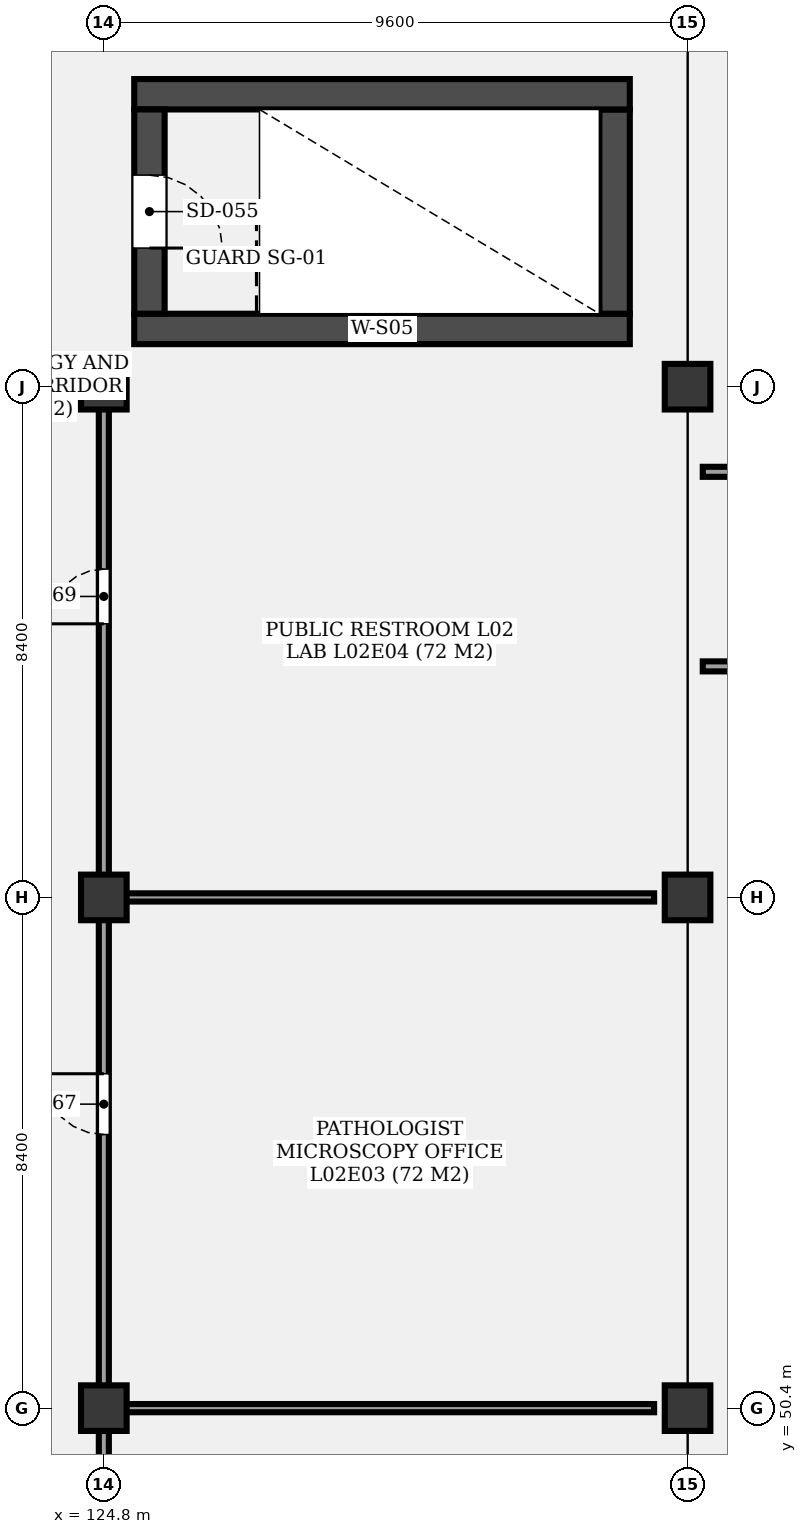
"""IFC4 building model, lengths in metres.
Left out: names, types, materials, properties, quantities, classifications, styles, units other than length and angle.
Written with IfcOpenShell. Run it as: python <this file> out.ifc"""

import sys

from ifc_helpers import new_model, si_unit, direction, frame, frame_2d, origin, origin_2d, place, context, subcontext, project, spatial, rectangle, extrude, element, fill, save


model = new_model("IFC4")
c1 = context("Model", 3, precision=1e-05, world=origin(), true_north=direction((0.0, 1.0)))
c2 = subcontext(c1, "Body", "Model", "MODEL_VIEW")
j1 = project(units=[si_unit("LENGTHUNIT", "METRE"), si_unit("PLANEANGLEUNIT", "RADIAN")], contexts=[c1])
p1 = place(None, origin())
s1 = spatial("IfcSite", under=j1, at=p1, CompositionType="ELEMENT")
p2 = place(p1, origin())
s2 = spatial("IfcBuilding", under=s1, at=p2, CompositionType="ELEMENT")
p3 = place(p2, frame((0.0, 0.0, 9.9)))
s3 = spatial("IfcBuildingStorey", under=s2, at=p3, CompositionType="ELEMENT", Elevation=9.9)
for number, where, z_axis, x_axis in (
    (1, (124.8, 50.4, 0.0), (0.0, 0.0, 1.0), (1.0, 0.0, 0.0)),
    (2, (124.8, 58.8, 0.0), (0.0, 0.0, 1.0), (1.0, 0.0, 0.0)),
    (3, (124.8, 67.2, 0.0), (0.0, 0.0, 1.0), (1.0, 0.0, 0.0)),
    (4, (134.4, 50.4, 0.0), (0.0, 0.0, 1.0), (1.0, 0.0, 0.0)),
    (5, (134.4, 58.8, 0.0), (0.0, 0.0, 1.0), (1.0, 0.0, 0.0)),
    (6, (134.4, 67.2, 0.0), (0.0, 0.0, 1.0), (1.0, 0.0, 0.0)),
):
    element("IfcColumn", number, at=place(p3, frame(where, z_axis=z_axis, x_axis=x_axis)), inside=s3, PredefinedType="COLUMN", context=c2, shape_type="SweptSolid", body=[
        extrude(rectangle(XDim=0.75, YDim=0.75, at=origin_2d()), origin(), (0.0, 0.0, 1.0), 3.6),
    ])
p4 = place(p3, frame((125.3, 68.15, 0.0), z_axis=(0.0, 0.0, 1.0), x_axis=(1.0, 0.0, 0.0)))
e7 = element("IfcWall", 7, at=p4, inside=s3, PredefinedType="SHEAR", context=c2, shape_type="SweptSolid", body=[
    extrude(rectangle(XDim=8.15, YDim=0.5, at=frame_2d((4.075, 0.0))), origin(), (0.0, 0.0, 1.0), 3.6),
])
p5 = place(p3, frame((133.2, 68.4, 0.0), z_axis=(0.0, 0.0, 1.0), x_axis=(0.0, 1.0, 0.0)))
e8 = element("IfcWall", 8, at=p5, inside=s3, PredefinedType="SHEAR", context=c2, shape_type="SweptSolid", body=[
    extrude(rectangle(XDim=3.36, YDim=0.5, at=frame_2d((1.68, 0.0))), origin(), (0.0, 0.0, 1.0), 3.6),
])
p6 = place(p3, frame((133.45, 72.01, 0.0), z_axis=(0.0, 0.0, 1.0), x_axis=(-1.0, 0.0, 0.0)))
e9 = element("IfcWall", 9, at=p6, inside=s3, PredefinedType="SHEAR", context=c2, shape_type="SweptSolid", body=[
    extrude(rectangle(XDim=8.15, YDim=0.5, at=frame_2d((4.075, 0.0))), origin(), (0.0, 0.0, 1.0), 3.6),
])
p7 = place(p3, frame((125.55, 71.76, 0.0), z_axis=(0.0, 0.0, 1.0), x_axis=(0.0, -1.0, 0.0)))
e10 = element("IfcWall", 10, at=p7, inside=s3, PredefinedType="SHEAR", context=c2, shape_type="SweptSolid", body=[
    extrude(rectangle(XDim=3.36, YDim=0.5, at=frame_2d((1.68, 0.0))), origin(), (0.0, 0.0, 1.0), 3.6),
])
p8 = place(p7, frame((1.08, 0.0, 0.0)))
e11 = element("IfcOpeningElement", 11, at=p8, cuts=e10, PredefinedType="OPENING", context=c2, shape_type="SweptSolid", body=[
    extrude(rectangle(XDim=1.2, YDim=2.2, at=frame_2d((0.6, 1.1))), frame((0.0, 0.26, 0.0), z_axis=(0.0, -1.0, 0.0), x_axis=(1.0, 0.0, 0.0)), (0.0, 0.0, 1.0), 0.52),
])
p9 = place(p3, frame((124.8, 42.25, 0.0), z_axis=(0.0, 0.0, 1.0), x_axis=(0.0, 1.0, 0.0)))
e12 = element("IfcWall", 12, at=p9, inside=s3, PredefinedType="PARTITIONING", context=c2, shape_type="SweptSolid", body=[
    extrude(rectangle(XDim=7.9, YDim=0.165, at=frame_2d((3.95, 0.0))), origin(), (0.0, 0.0, 1.0), 2.48),
])
p10 = place(p9, frame((4.25, 0.0, 0.0)))
e13 = element("IfcOpeningElement", 13, at=p10, cuts=e12, PredefinedType="OPENING", context=c2, shape_type="SweptSolid", body=[
    extrude(rectangle(XDim=0.9, YDim=2.1, at=frame_2d((0.45, 1.05))), frame((0.0, 0.093, 0.0), z_axis=(0.0, -1.0, 0.0), x_axis=(1.0, 0.0, 0.0)), (0.0, 0.0, 1.0), 0.185),
])
p11 = place(p3, frame((124.8, 50.65, 0.0), z_axis=(0.0, 0.0, 1.0), x_axis=(0.0, 1.0, 0.0)))
e14 = element("IfcWall", 14, at=p11, inside=s3, PredefinedType="PARTITIONING", context=c2, shape_type="SweptSolid", body=[
    extrude(rectangle(XDim=7.9, YDim=0.165, at=frame_2d((3.95, 0.0))), origin(), (0.0, 0.0, 1.0), 2.48),
])
p12 = place(p11, frame((4.25, 0.0, 0.0)))
e15 = element("IfcOpeningElement", 15, at=p12, cuts=e14, PredefinedType="OPENING", context=c2, shape_type="SweptSolid", body=[
    extrude(rectangle(XDim=1.0, YDim=2.2, at=frame_2d((0.5, 1.1))), frame((0.0, 0.093, 0.0), z_axis=(0.0, -1.0, 0.0), x_axis=(1.0, 0.0, 0.0)), (0.0, 0.0, 1.0), 0.185),
])
p13 = place(p3, frame((124.95, 50.4, 0.0), z_axis=(0.0, 0.0, 1.0), x_axis=(1.0, 0.0, 0.0)))
e16 = element("IfcWall", 16, at=p13, inside=s3, PredefinedType="PARTITIONING", context=c2, shape_type="SweptSolid", body=[
    extrude(rectangle(XDim=8.9, YDim=0.135, at=frame_2d((4.45, 0.0))), origin(), (0.0, 0.0, 1.0), 2.48),
])
p14 = place(p3, frame((124.8, 59.05, 0.0), z_axis=(0.0, 0.0, 1.0), x_axis=(0.0, 1.0, 0.0)))
e17 = element("IfcWall", 17, at=p14, inside=s3, PredefinedType="PARTITIONING", context=c2, shape_type="SweptSolid", body=[
    extrude(rectangle(XDim=7.9, YDim=0.165, at=frame_2d((3.95, 0.0))), origin(), (0.0, 0.0, 1.0), 2.48),
])
p15 = place(p14, frame((4.25, 0.0, 0.0)))
e18 = element("IfcOpeningElement", 18, at=p15, cuts=e17, PredefinedType="OPENING", context=c2, shape_type="SweptSolid", body=[
    extrude(rectangle(XDim=0.9, YDim=2.1, at=frame_2d((0.45, 1.05))), frame((0.0, 0.093, 0.0), z_axis=(0.0, -1.0, 0.0), x_axis=(1.0, 0.0, 0.0)), (0.0, 0.0, 1.0), 0.185),
])
p16 = place(p3, frame((124.95, 58.8, 0.0), z_axis=(0.0, 0.0, 1.0), x_axis=(1.0, 0.0, 0.0)))
e19 = element("IfcWall", 19, at=p16, inside=s3, PredefinedType="PARTITIONING", context=c2, shape_type="SweptSolid", body=[
    extrude(rectangle(XDim=8.9, YDim=0.135, at=frame_2d((4.45, 0.0))), origin(), (0.0, 0.0, 1.0), 2.48),
])
p17 = place(p3, frame((134.65, 62.6, 0.0), z_axis=(0.0, 0.0, 1.0), x_axis=(1.0, 0.0, 0.0)))
e20 = element("IfcWall", 20, at=p17, inside=s3, PredefinedType="PARTITIONING", context=c2, shape_type="SweptSolid", body=[
    extrude(rectangle(XDim=9.633, YDim=0.165, at=frame_2d((4.816, 0.0))), origin(), (0.0, 0.0, 1.0), 2.48),
])
p18 = place(p17, frame((2.65, 0.0, 0.0)))
e21 = element("IfcOpeningElement", 21, at=p18, cuts=e20, PredefinedType="OPENING", context=c2, shape_type="SweptSolid", body=[
    extrude(rectangle(XDim=1.1, YDim=2.1, at=frame_2d((0.55, 1.05))), frame((0.0, 0.093, 0.0), z_axis=(0.0, -1.0, 0.0), x_axis=(1.0, 0.0, 0.0)), (0.0, 0.0, 1.0), 0.185),
])
p19 = place(p3, frame((134.65, 65.8, 0.0), z_axis=(0.0, 0.0, 1.0), x_axis=(1.0, 0.0, 0.0)))
e22 = element("IfcWall", 22, at=p19, inside=s3, PredefinedType="PARTITIONING", context=c2, shape_type="SweptSolid", body=[
    extrude(rectangle(XDim=9.633, YDim=0.165, at=frame_2d((4.816, 0.0))), origin(), (0.0, 0.0, 1.0), 2.48),
])
p20 = place(p19, frame((4.75, 0.0, 0.0)))
e23 = element("IfcOpeningElement", 23, at=p20, cuts=e22, PredefinedType="OPENING", context=c2, shape_type="SweptSolid", body=[
    extrude(rectangle(XDim=1.0, YDim=2.2, at=frame_2d((0.5, 1.1))), frame((0.0, 0.093, 0.0), z_axis=(0.0, -1.0, 0.0), x_axis=(1.0, 0.0, 0.0)), (0.0, 0.0, 1.0), 0.185),
])
p21 = place(p8, origin())
e24 = element("IfcDoor", 24, at=p21, inside=s3, OperationType="SINGLE_SWING_RIGHT", PredefinedType="DOOR", context=c2, shape_type="SweptSolid", body=[
    extrude(rectangle(XDim=1.2, YDim=2.2, at=frame_2d((0.6, 1.1))), frame((0.0, 0.025, 0.0), z_axis=(0.0, -1.0, 0.0), x_axis=(1.0, 0.0, 0.0)), (0.0, 0.0, 1.0), 0.05),
])
fill(e11, e24)
p22 = place(p12, origin())
e25 = element("IfcDoor", 25, at=p22, inside=s3, OperationType="SINGLE_SWING_RIGHT", PredefinedType="DOOR", context=c2, shape_type="SweptSolid", body=[
    extrude(rectangle(XDim=1.0, YDim=2.2, at=frame_2d((0.5, 1.1))), frame((0.0, 0.025, 0.0), z_axis=(0.0, -1.0, 0.0), x_axis=(1.0, 0.0, 0.0)), (0.0, 0.0, 1.0), 0.05),
])
fill(e15, e25)
p23 = place(p15, origin())
e26 = element("IfcDoor", 26, at=p23, inside=s3, OperationType="SINGLE_SWING_LEFT", PredefinedType="DOOR", context=c2, shape_type="SweptSolid", body=[
    extrude(rectangle(XDim=0.9, YDim=2.1, at=frame_2d((0.45, 1.05))), frame((0.0, 0.025, 0.0), z_axis=(0.0, -1.0, 0.0), x_axis=(1.0, 0.0, 0.0)), (0.0, 0.0, 1.0), 0.05),
])
fill(e18, e26)
save(model, sys.argv[1])
